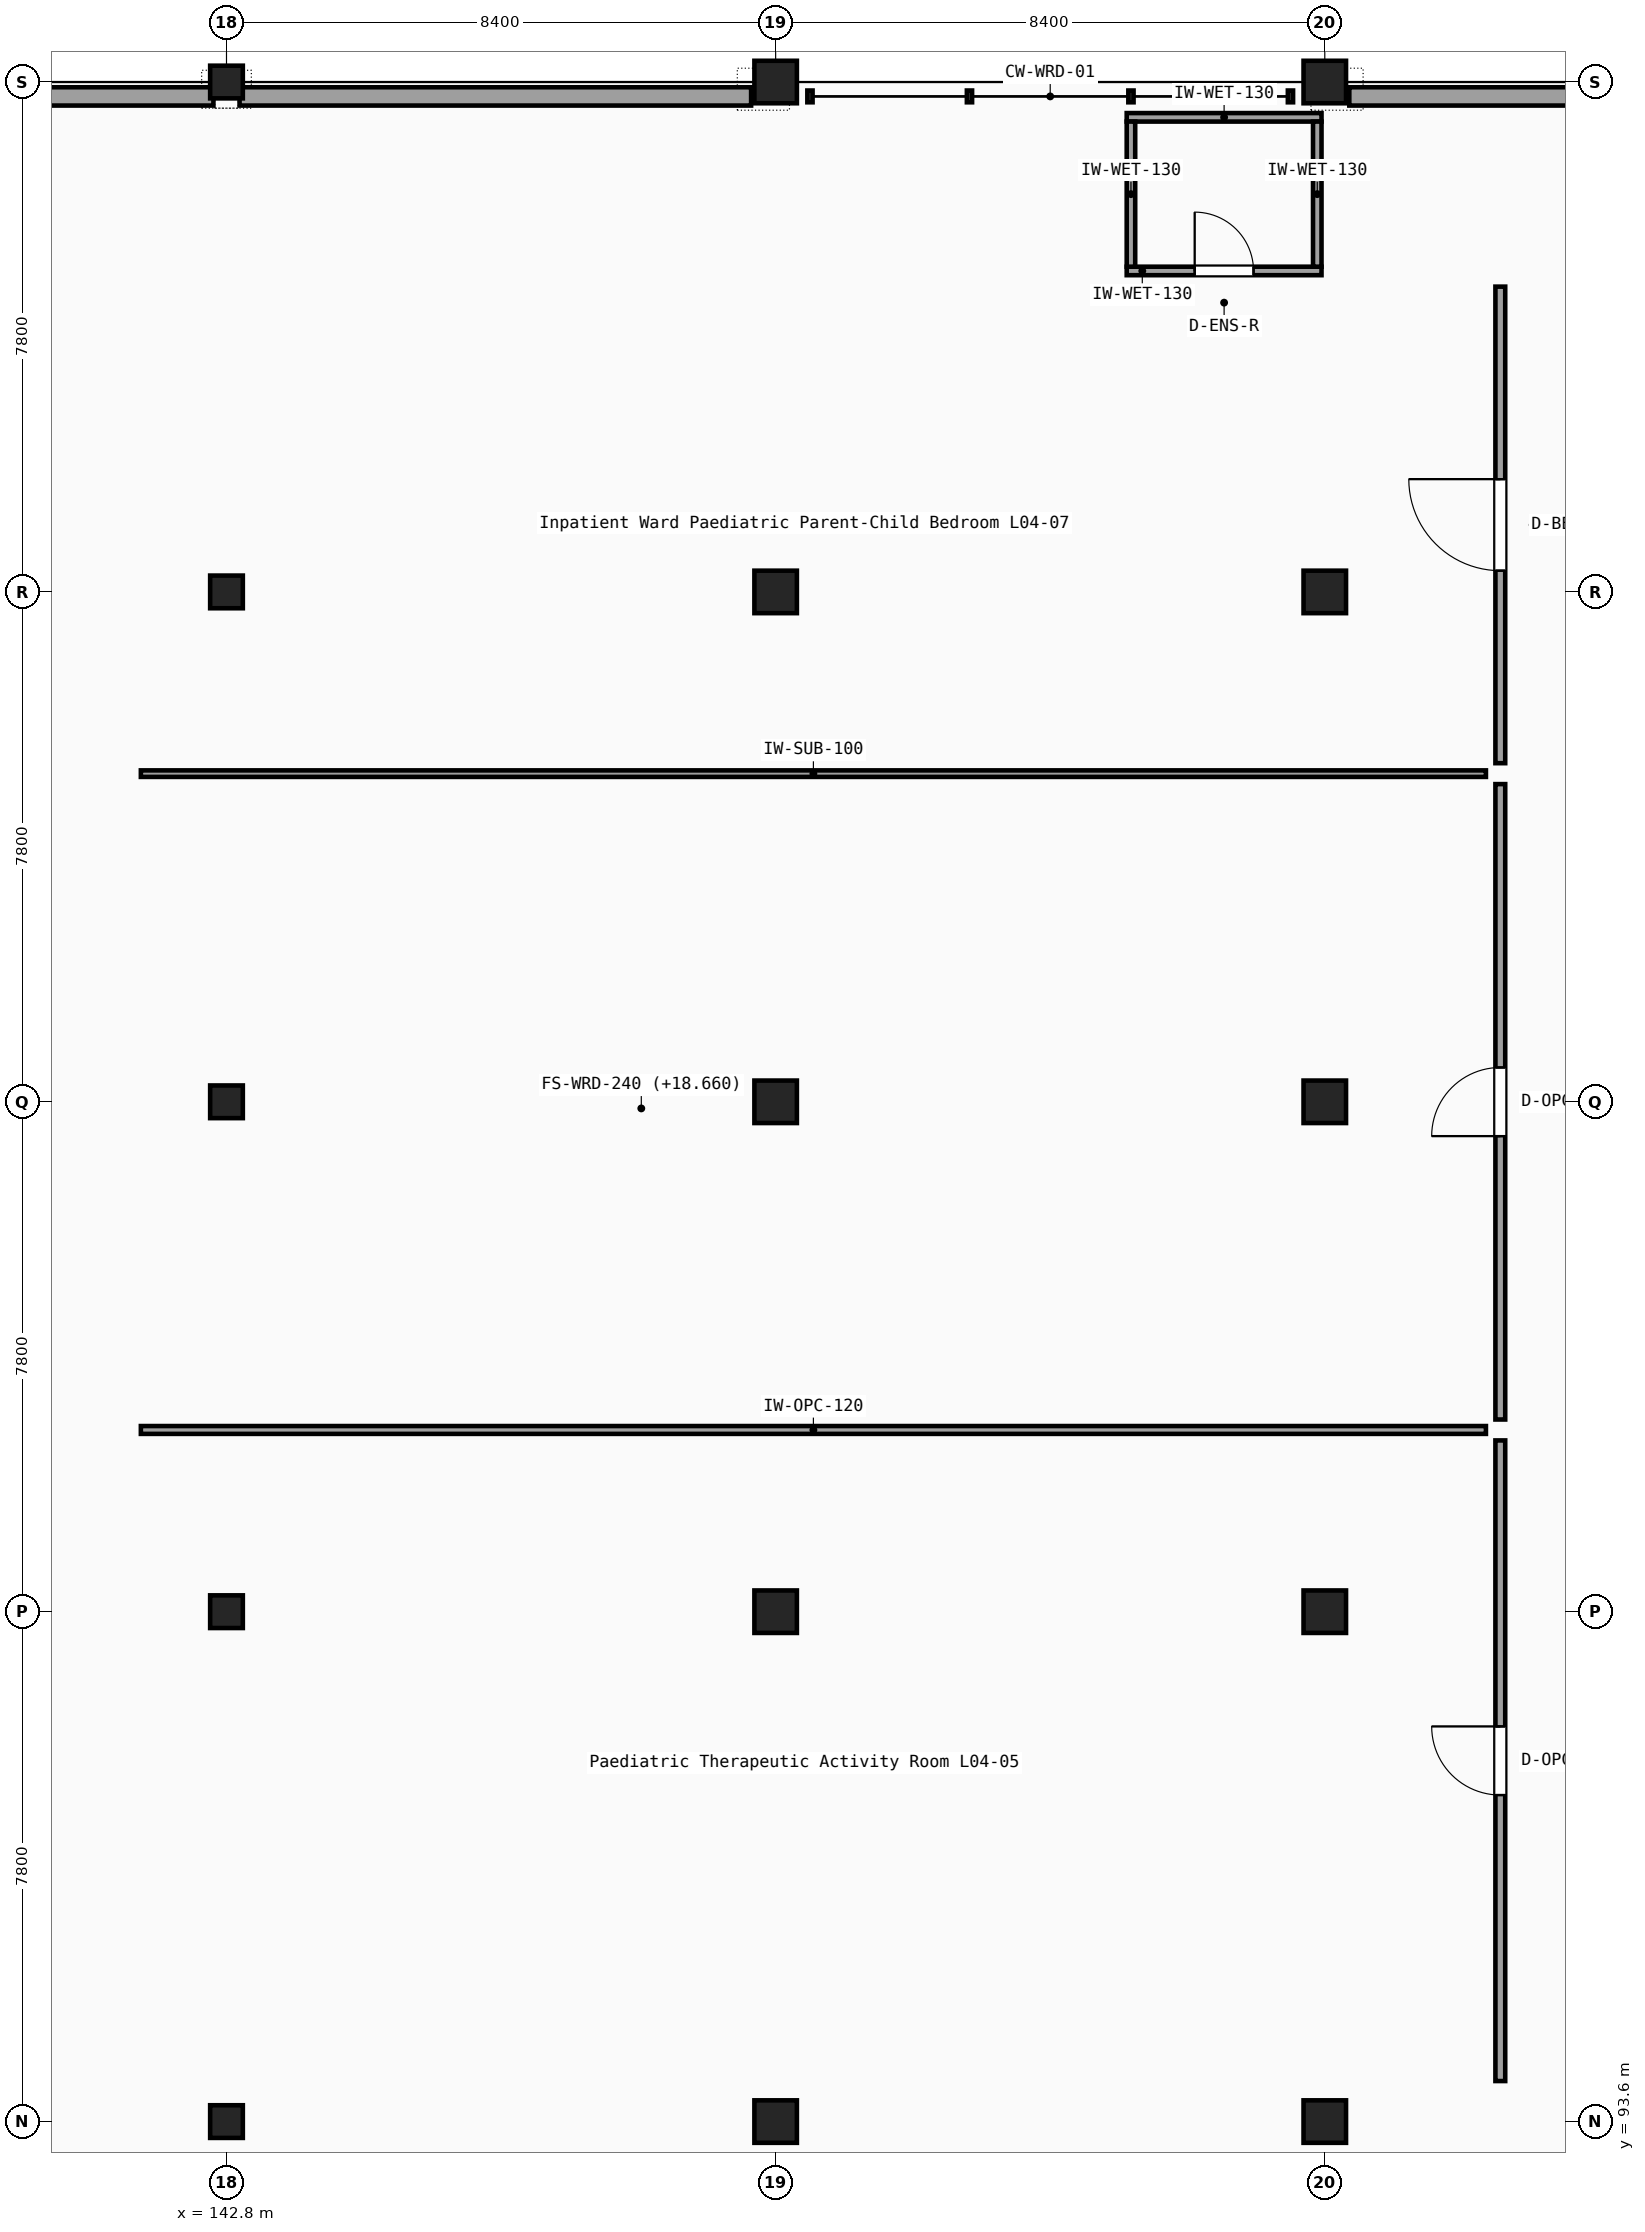
"""IFC4 building model, lengths in metres.
Left out: names, types, materials, properties, quantities, classifications, styles, units other than length and angle.
Written with IfcOpenShell. Run it as: python <this file> out.ifc"""

import sys

from ifc_helpers import new_model, si_unit, direction, frame, frame_2d, origin, origin_2d, place, context, subcontext, project, spatial, rectangle, i_section, extrude, element, fill, save


model = new_model("IFC4")
c1 = context("Model", 3, precision=1e-05, world=origin(), true_north=direction((0.0, 1.0)))
c2 = subcontext(c1, "Body", "Model", "MODEL_VIEW")
j1 = project(units=[si_unit("LENGTHUNIT", "METRE"), si_unit("PLANEANGLEUNIT", "RADIAN")], contexts=[c1])
p1 = place(None, origin())
s1 = spatial("IfcSite", under=j1, at=p1, CompositionType="ELEMENT")
p2 = place(p1, origin())
s2 = spatial("IfcBuilding", under=s1, at=p2, CompositionType="ELEMENT")
p3 = place(p2, frame((0.0, 0.0, 18.9)))
s3 = spatial("IfcBuildingStorey", under=s2, at=p3, CompositionType="ELEMENT", Elevation=18.9)
for number, where, z_axis, x_axis in (
    (1, (142.8, 93.6, 0.0), (0.0, 0.0, 1.0), (1.0, 0.0, 0.0)),
    (2, (142.8, 101.4, 0.0), (0.0, 0.0, 1.0), (1.0, 0.0, 0.0)),
    (3, (142.8, 109.2, 0.0), (0.0, 0.0, 1.0), (1.0, 0.0, 0.0)),
    (4, (142.8, 117.0, 0.0), (0.0, 0.0, 1.0), (1.0, 0.0, 0.0)),
    (5, (142.8, 124.8, 0.0), (0.0, 0.0, 1.0), (1.0, 0.0, 0.0)),
):
    element("IfcColumn", number, at=place(p3, frame(where, z_axis=z_axis, x_axis=x_axis)), inside=s3, PredefinedType="COLUMN", context=c2, shape_type="SweptSolid", body=[
        extrude(i_section(OverallWidth=0.3, OverallDepth=0.5, WebThickness=0.014, FlangeThickness=0.028, FilletRadius=0.027, at=origin_2d()), origin(), (0.0, 0.0, 1.0), 4.05),
    ])
for number, where, z_axis, x_axis in (
    (6, (151.2, 93.6, 0.0), (0.0, 0.0, 1.0), (1.0, 0.0, 0.0)),
    (7, (151.2, 101.4, 0.0), (0.0, 0.0, 1.0), (1.0, 0.0, 0.0)),
    (8, (151.2, 109.2, 0.0), (0.0, 0.0, 1.0), (1.0, 0.0, 0.0)),
    (9, (151.2, 117.0, 0.0), (0.0, 0.0, 1.0), (1.0, 0.0, 0.0)),
    (10, (151.2, 124.8, 0.0), (0.0, 0.0, 1.0), (1.0, 0.0, 0.0)),
    (11, (159.6, 93.6, 0.0), (0.0, 0.0, 1.0), (1.0, 0.0, 0.0)),
    (12, (159.6, 101.4, 0.0), (0.0, 0.0, 1.0), (1.0, 0.0, 0.0)),
    (13, (159.6, 109.2, 0.0), (0.0, 0.0, 1.0), (1.0, 0.0, 0.0)),
    (14, (159.6, 117.0, 0.0), (0.0, 0.0, 1.0), (1.0, 0.0, 0.0)),
    (15, (159.6, 124.8, 0.0), (0.0, 0.0, 1.0), (1.0, 0.0, 0.0)),
):
    element("IfcColumn", number, at=place(p3, frame(where, z_axis=z_axis, x_axis=x_axis)), inside=s3, PredefinedType="COLUMN", context=c2, shape_type="SweptSolid", body=[
        extrude(rectangle(XDim=0.65, YDim=0.65, at=origin_2d()), origin(), (0.0, 0.0, 1.0), 4.05),
    ])
p4 = place(p3, frame((135.72, 124.58, 0.0), z_axis=(0.0, 0.0, 1.0), x_axis=(1.0, 0.0, 0.0)))
e16 = element("IfcWall", 16, at=p4, inside=s3, PredefinedType="SOLIDWALL", context=c2, shape_type="SweptSolid", body=[
    extrude(rectangle(XDim=6.88, YDim=0.28, at=frame_2d((3.44, 0.0))), origin(), (0.0, 0.0, 1.0), 3.52),
])
p5 = place(p4, frame((2.84, 0.0, 0.9)))
e17 = element("IfcOpeningElement", 17, at=p5, cuts=e16, PredefinedType="OPENING", context=c2, shape_type="SweptSolid", body=[
    extrude(rectangle(XDim=1.2, YDim=1.6, at=frame_2d((0.6, 0.8))), frame((0.0, 0.15, 0.0), z_axis=(0.0, -1.0, 0.0), x_axis=(1.0, 0.0, 0.0)), (0.0, 0.0, 1.0), 0.3),
])
for number, where, z_axis, x_axis in (
    (18, (143.0, 124.58, 0.0), (0.0, 0.0, 1.0), (1.0, 0.0, 0.0)),
    (19, (159.975, 124.58, 0.0), (0.0, 0.0, 1.0), (1.0, 0.0, 0.0)),
):
    element("IfcWall", number, at=place(p3, frame(where, z_axis=z_axis, x_axis=x_axis)), inside=s3, PredefinedType="SOLIDWALL", context=c2, shape_type="SweptSolid", body=[
        extrude(rectangle(XDim=7.825, YDim=0.28, at=frame_2d((3.913, 0.0))), origin(), (0.0, 0.0, 1.0), 3.52),
    ])
p6 = place(p3, frame((162.285, 94.22, 0.0), z_axis=(0.0, 0.0, 1.0), x_axis=(0.0, 1.0, 0.0)))
e20 = element("IfcWall", 20, at=p6, inside=s3, PredefinedType="PARTITIONING", context=c2, shape_type="SweptSolid", body=[
    extrude(rectangle(XDim=9.8, YDim=0.15, at=frame_2d((4.9, 0.0))), origin(), (0.0, 0.0, 1.0), 3.25),
])
p7 = place(p6, frame((4.375, 0.0, 0.0)))
e21 = element("IfcOpeningElement", 21, at=p7, cuts=e20, PredefinedType="OPENING", context=c2, shape_type="SweptSolid", body=[
    extrude(rectangle(XDim=1.05, YDim=2.15, at=frame_2d((0.525, 1.075))), frame((0.0, 0.085, 0.0), z_axis=(0.0, -1.0, 0.0), x_axis=(1.0, 0.0, 0.0)), (0.0, 0.0, 1.0), 0.17),
])
p8 = place(p3, frame((141.49, 104.18, 0.0), z_axis=(0.0, 0.0, 1.0), x_axis=(1.0, 0.0, 0.0)))
e22 = element("IfcWall", 22, at=p8, inside=s3, PredefinedType="PARTITIONING", context=c2, shape_type="SweptSolid", body=[
    extrude(rectangle(XDim=20.575, YDim=0.12, at=frame_2d((10.288, 0.0))), origin(), (0.0, 0.0, 1.0), 3.53),
])
p9 = place(p3, frame((162.285, 104.34, 0.0), z_axis=(0.0, 0.0, 1.0), x_axis=(0.0, 1.0, 0.0)))
e23 = element("IfcWall", 23, at=p9, inside=s3, PredefinedType="PARTITIONING", context=c2, shape_type="SweptSolid", body=[
    extrude(rectangle(XDim=9.72, YDim=0.15, at=frame_2d((4.86, 0.0))), origin(), (0.0, 0.0, 1.0), 3.25),
])
p10 = place(p9, frame((4.335, 0.0, 0.0)))
e24 = element("IfcOpeningElement", 24, at=p10, cuts=e23, PredefinedType="OPENING", context=c2, shape_type="SweptSolid", body=[
    extrude(rectangle(XDim=1.05, YDim=2.15, at=frame_2d((0.525, 1.075))), frame((0.0, 0.085, 0.0), z_axis=(0.0, -1.0, 0.0), x_axis=(1.0, 0.0, 0.0)), (0.0, 0.0, 1.0), 0.17),
])
p11 = place(p3, frame((141.49, 114.22, 0.0), z_axis=(0.0, 0.0, 1.0), x_axis=(1.0, 0.0, 0.0)))
e25 = element("IfcWall", 25, at=p11, inside=s3, PredefinedType="PARTITIONING", context=c2, shape_type="SweptSolid", body=[
    extrude(rectangle(XDim=20.575, YDim=0.1, at=frame_2d((10.288, 0.0))), origin(), (0.0, 0.0, 1.0), 3.53),
])
p12 = place(p3, frame((162.285, 114.38, 0.0), z_axis=(0.0, 0.0, 1.0), x_axis=(0.0, 1.0, 0.0)))
e26 = element("IfcWall", 26, at=p12, inside=s3, PredefinedType="PARTITIONING", context=c2, shape_type="SweptSolid", body=[
    extrude(rectangle(XDim=7.29, YDim=0.15, at=frame_2d((3.645, 0.0))), origin(), (0.0, 0.0, 1.0), 3.25),
])
p13 = place(p12, frame((2.945, 0.0, 0.0)))
e27 = element("IfcOpeningElement", 27, at=p13, cuts=e26, PredefinedType="OPENING", context=c2, shape_type="SweptSolid", body=[
    extrude(rectangle(XDim=1.4, YDim=2.2, at=frame_2d((0.7, 1.1))), frame((0.0, 0.085, 0.0), z_axis=(0.0, -1.0, 0.0), x_axis=(1.0, 0.0, 0.0)), (0.0, 0.0, 1.0), 0.17),
])
p14 = place(p3, frame((156.57, 121.91, 0.0), z_axis=(0.0, 0.0, 1.0), x_axis=(1.0, 0.0, 0.0)))
e28 = element("IfcWall", 28, at=p14, inside=s3, PredefinedType="PARTITIONING", context=c2, shape_type="SweptSolid", body=[
    extrude(rectangle(XDim=2.98, YDim=0.13, at=frame_2d((1.49, 0.0))), origin(), (0.0, 0.0, 1.0), 3.52),
])
p15 = place(p14, frame((1.04, 0.0, 0.0)))
e29 = element("IfcOpeningElement", 29, at=p15, cuts=e28, PredefinedType="OPENING", context=c2, shape_type="SweptSolid", body=[
    extrude(rectangle(XDim=0.9, YDim=2.1, at=frame_2d((0.45, 1.05))), frame((0.0, 0.075, 0.0), z_axis=(0.0, -1.0, 0.0), x_axis=(1.0, 0.0, 0.0)), (0.0, 0.0, 1.0), 0.15),
])
p16 = place(p3, frame((156.57, 124.26, 0.0), z_axis=(0.0, 0.0, 1.0), x_axis=(1.0, 0.0, 0.0)))
e30 = element("IfcWall", 30, at=p16, inside=s3, PredefinedType="PARTITIONING", context=c2, shape_type="SweptSolid", body=[
    extrude(rectangle(XDim=2.98, YDim=0.13, at=frame_2d((1.49, 0.0))), origin(), (0.0, 0.0, 1.0), 3.52),
])
p17 = place(p3, frame((156.635, 121.975, 0.0), z_axis=(0.0, 0.0, 1.0), x_axis=(0.0, 1.0, 0.0)))
e31 = element("IfcWall", 31, at=p17, inside=s3, PredefinedType="PARTITIONING", context=c2, shape_type="SweptSolid", body=[
    extrude(rectangle(XDim=2.22, YDim=0.13, at=frame_2d((1.11, 0.0))), origin(), (0.0, 0.0, 1.0), 3.77),
])
p18 = place(p3, frame((159.485, 121.975, 0.0), z_axis=(0.0, 0.0, 1.0), x_axis=(0.0, 1.0, 0.0)))
e32 = element("IfcWall", 32, at=p18, inside=s3, PredefinedType="PARTITIONING", context=c2, shape_type="SweptSolid", body=[
    extrude(rectangle(XDim=2.22, YDim=0.13, at=frame_2d((1.11, 0.0))), origin(), (0.0, 0.0, 1.0), 3.52),
])
p19 = place(p7, origin())
e33 = element("IfcDoor", 33, at=p19, inside=s3, OperationType="SINGLE_SWING_RIGHT", PredefinedType="DOOR", context=c2, shape_type="SweptSolid", body=[
    extrude(rectangle(XDim=1.05, YDim=2.15, at=frame_2d((0.525, 1.075))), frame((0.0, 0.025, 0.0), z_axis=(0.0, -1.0, 0.0), x_axis=(1.0, 0.0, 0.0)), (0.0, 0.0, 1.0), 0.05),
])
fill(e21, e33)
p20 = place(p10, origin())
e34 = element("IfcDoor", 34, at=p20, inside=s3, OperationType="SINGLE_SWING_LEFT", PredefinedType="DOOR", context=c2, shape_type="SweptSolid", body=[
    extrude(rectangle(XDim=1.05, YDim=2.15, at=frame_2d((0.525, 1.075))), frame((0.0, 0.025, 0.0), z_axis=(0.0, -1.0, 0.0), x_axis=(1.0, 0.0, 0.0)), (0.0, 0.0, 1.0), 0.05),
])
fill(e24, e34)
p21 = place(p13, origin())
e35 = element("IfcDoor", 35, at=p21, inside=s3, OperationType="SINGLE_SWING_RIGHT", PredefinedType="DOOR", context=c2, shape_type="SweptSolid", body=[
    extrude(rectangle(XDim=1.4, YDim=2.2, at=frame_2d((0.7, 1.1))), frame((0.0, 0.025, 0.0), z_axis=(0.0, -1.0, 0.0), x_axis=(1.0, 0.0, 0.0)), (0.0, 0.0, 1.0), 0.05),
])
fill(e27, e35)
p22 = place(p15, origin())
e36 = element("IfcDoor", 36, at=p22, inside=s3, OperationType="SINGLE_SWING_LEFT", PredefinedType="DOOR", context=c2, shape_type="SweptSolid", body=[
    extrude(rectangle(XDim=0.9, YDim=2.1, at=frame_2d((0.45, 1.05))), frame((0.0, 0.025, 0.0), z_axis=(0.0, -1.0, 0.0), x_axis=(1.0, 0.0, 0.0)), (0.0, 0.0, 1.0), 0.05),
])
fill(e29, e36)
save(model, sys.argv[1])
